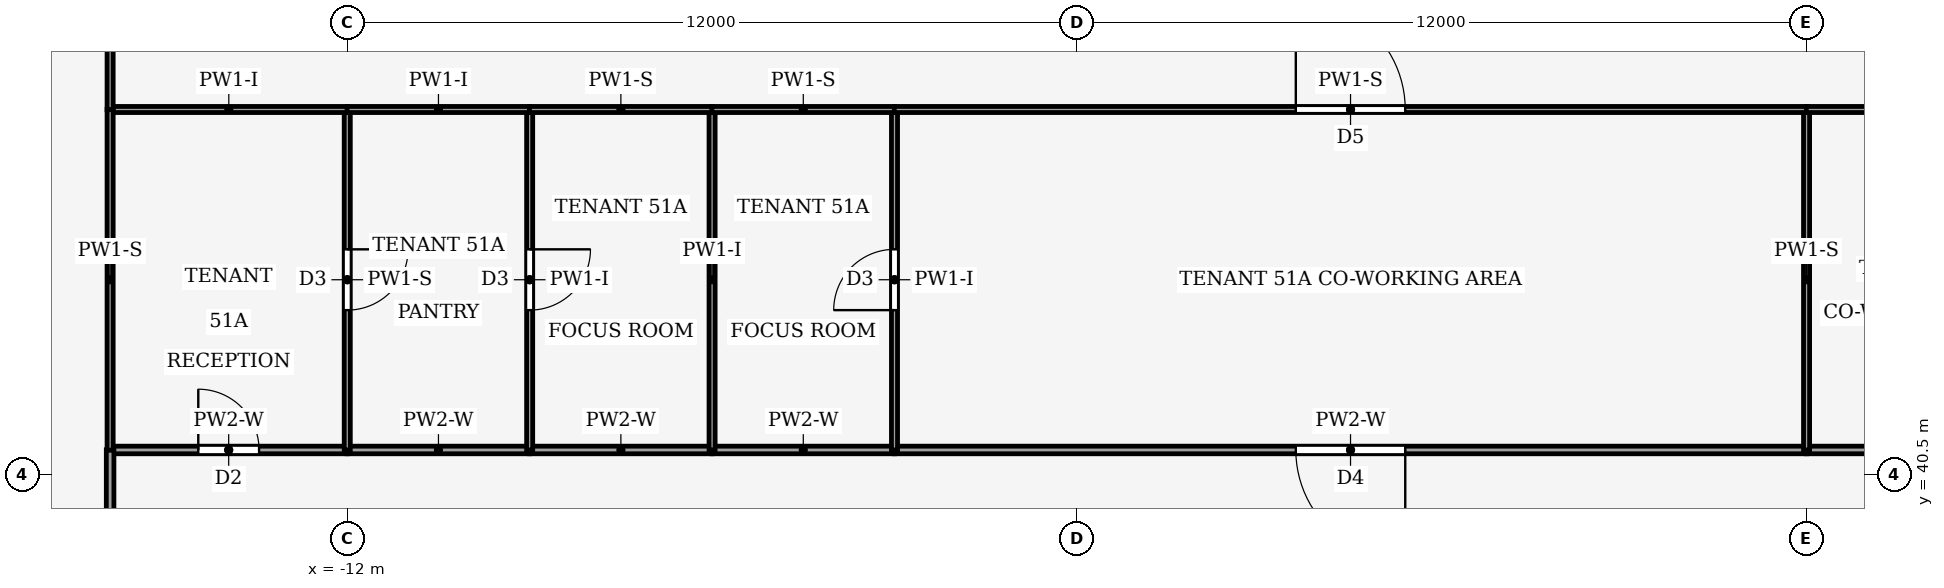
"""IFC4 building model, lengths in metres.
Left out: names, types, materials, properties, quantities, classifications, styles, units other than length and angle.
Written with IfcOpenShell. Run it as: python <this file> out.ifc"""

import sys

from ifc_helpers import new_model, si_unit, direction, frame, frame_2d, origin, place, context, subcontext, project, spatial, rectangle, extrude, element, fill, save


model = new_model("IFC4")
c1 = context("Model", 3, precision=1e-05, world=origin(), true_north=direction((0.0, 1.0)))
c2 = subcontext(c1, "Body", "Model", "MODEL_VIEW")
j1 = project(units=[si_unit("LENGTHUNIT", "METRE"), si_unit("PLANEANGLEUNIT", "RADIAN")], contexts=[c1])
p1 = place(None, origin())
s1 = spatial("IfcSite", under=j1, at=p1, CompositionType="ELEMENT")
p2 = place(p1, origin())
s2 = spatial("IfcBuilding", under=s1, at=p2, CompositionType="ELEMENT")
p3 = place(p2, frame((0.0, 0.0, 222.0)))
s3 = spatial("IfcBuildingStorey", under=s2, at=p3, CompositionType="ELEMENT", Elevation=222.0)
p4 = place(p3, frame((-15.9, 40.9, 0.0), z_axis=(0.0, 0.0, 1.0), x_axis=(1.0, 0.0, 0.0)))
e1 = element("IfcWall", 1, at=p4, inside=s3, PredefinedType="PARTITIONING", context=c2, shape_type="SweptSolid", body=[
    extrude(rectangle(XDim=3.9, YDim=0.125, at=frame_2d((1.95, 0.0))), origin(), (0.0, 0.0, 1.0), 3.32),
])
p5 = place(p4, frame((1.45, 0.0, 0.0)))
e2 = element("IfcOpeningElement", 2, at=p5, cuts=e1, PredefinedType="OPENING", context=c2, shape_type="SweptSolid", body=[
    extrude(rectangle(XDim=1.0, YDim=2.1, at=frame_2d((0.5, 1.05))), frame((0.0, 0.073, 0.0), z_axis=(0.0, -1.0, 0.0), x_axis=(1.0, 0.0, 0.0)), (0.0, 0.0, 1.0), 0.145),
])
for number, where, z_axis, x_axis in (
    (3, (-9.0, 40.9, 0.0), (0.0, 0.0, 1.0), (-1.0, 0.0, 0.0)),
    (4, (-6.0, 40.9, 0.0), (0.0, 0.0, 1.0), (-1.0, 0.0, 0.0)),
    (5, (-3.0, 40.9, 0.0), (0.0, 0.0, 1.0), (-1.0, 0.0, 0.0)),
):
    element("IfcWall", number, at=place(p3, frame(where, z_axis=z_axis, x_axis=x_axis)), inside=s3, PredefinedType="PARTITIONING", context=c2, shape_type="SweptSolid", body=[
        extrude(rectangle(XDim=3.0, YDim=0.125, at=frame_2d((1.5, 0.0))), origin(), (0.0, 0.0, 1.0), 3.32),
    ])
p6 = place(p3, frame((12.0, 40.9, 0.0), z_axis=(0.0, 0.0, 1.0), x_axis=(-1.0, 0.0, 0.0)))
e6 = element("IfcWall", 6, at=p6, inside=s3, PredefinedType="PARTITIONING", context=c2, shape_type="SweptSolid", body=[
    extrude(rectangle(XDim=15.0, YDim=0.125, at=frame_2d((7.5, 0.0))), origin(), (0.0, 0.0, 1.0), 3.32),
])
p7 = place(p6, frame((6.6, 0.0, 0.0)))
e7 = element("IfcOpeningElement", 7, at=p7, cuts=e6, PredefinedType="OPENING", context=c2, shape_type="SweptSolid", body=[
    extrude(rectangle(XDim=1.8, YDim=2.1, at=frame_2d((0.9, 1.05))), frame((0.0, 0.073, 0.0), z_axis=(0.0, -1.0, 0.0), x_axis=(1.0, 0.0, 0.0)), (0.0, 0.0, 1.0), 0.145),
])
p8 = place(p3, frame((12.0, 40.9, 0.0), z_axis=(0.0, 0.0, 1.0), x_axis=(1.0, 0.0, 0.0)))
e8 = element("IfcWall", 8, at=p8, inside=s3, PredefinedType="PARTITIONING", context=c2, shape_type="SweptSolid", body=[
    extrude(rectangle(XDim=3.9, YDim=0.125, at=frame_2d((1.95, 0.0))), origin(), (0.0, 0.0, 1.0), 3.32),
])
p9 = place(p8, frame((1.45, 0.0, 0.0)))
e9 = element("IfcOpeningElement", 9, at=p9, cuts=e8, PredefinedType="OPENING", context=c2, shape_type="SweptSolid", body=[
    extrude(rectangle(XDim=1.0, YDim=2.1, at=frame_2d((0.5, 1.05))), frame((0.0, 0.073, 0.0), z_axis=(0.0, -1.0, 0.0), x_axis=(1.0, 0.0, 0.0)), (0.0, 0.0, 1.0), 0.145),
])
p10 = place(p3, frame((-15.9, 34.5, 0.0), z_axis=(0.0, 0.0, 1.0), x_axis=(0.0, 1.0, 0.0)))
e10 = element("IfcWall", 10, at=p10, inside=s3, PredefinedType="PARTITIONING", context=c2, shape_type="SweptSolid", body=[
    extrude(rectangle(XDim=6.404, YDim=0.125, at=frame_2d((3.202, 0.0))), origin(), (0.0, 0.0, 1.0), 3.02),
])
p11 = place(p10, frame((2.702, 0.0, 0.0)))
e11 = element("IfcOpeningElement", 11, at=p11, cuts=e10, PredefinedType="OPENING", context=c2, shape_type="SweptSolid", body=[
    extrude(rectangle(XDim=1.0, YDim=2.1, at=frame_2d((0.5, 1.05))), frame((0.0, 0.073, 0.0), z_axis=(0.0, -1.0, 0.0), x_axis=(1.0, 0.0, 0.0)), (0.0, 0.0, 1.0), 0.145),
])
p12 = place(p3, frame((-12.0, 46.5, 0.0), z_axis=(0.0, 0.0, 1.0), x_axis=(0.0, -1.0, 0.0)))
e12 = element("IfcWall", 12, at=p12, inside=s3, PredefinedType="PARTITIONING", context=c2, shape_type="SweptSolid", body=[
    extrude(rectangle(XDim=5.6, YDim=0.1, at=frame_2d((2.8, 0.0))), origin(), (0.0, 0.0, 1.0), 3.32),
])
p13 = place(p12, frame((2.3, 0.0, 0.0)))
e13 = element("IfcOpeningElement", 13, at=p13, cuts=e12, PredefinedType="OPENING", context=c2, shape_type="SweptSolid", body=[
    extrude(rectangle(XDim=1.0, YDim=2.1, at=frame_2d((0.5, 1.05))), frame((0.0, 0.06, 0.0), z_axis=(0.0, -1.0, 0.0), x_axis=(1.0, 0.0, 0.0)), (0.0, 0.0, 1.0), 0.12),
])
p14 = place(p3, frame((-11.996, 46.5, 0.0), z_axis=(0.0, 0.0, 1.0), x_axis=(-1.0, 0.0, 0.0)))
e14 = element("IfcWall", 14, at=p14, inside=s3, PredefinedType="PARTITIONING", context=c2, shape_type="SweptSolid", body=[
    extrude(rectangle(XDim=3.904, YDim=0.1, at=frame_2d((1.952, 0.0))), origin(), (0.0, 0.0, 1.0), 3.75),
])
p15 = place(p3, frame((-15.9, 46.504, 0.0), z_axis=(0.0, 0.0, 1.0), x_axis=(0.0, -1.0, 0.0)))
e15 = element("IfcWall", 15, at=p15, inside=s3, PredefinedType="PARTITIONING", context=c2, shape_type="SweptSolid", body=[
    extrude(rectangle(XDim=5.608, YDim=0.1, at=frame_2d((2.804, 0.0))), origin(), (0.0, 0.0, 1.0), 3.32),
])
p16 = place(p3, frame((-9.0, 46.5, 0.0), z_axis=(0.0, 0.0, 1.0), x_axis=(0.0, -1.0, 0.0)))
e16 = element("IfcWall", 16, at=p16, inside=s3, PredefinedType="PARTITIONING", context=c2, shape_type="SweptSolid", body=[
    extrude(rectangle(XDim=5.6, YDim=0.1, at=frame_2d((2.8, 0.0))), origin(), (0.0, 0.0, 1.0), 3.75),
])
p17 = place(p16, frame((2.3, 0.0, 0.0)))
e17 = element("IfcOpeningElement", 17, at=p17, cuts=e16, PredefinedType="OPENING", context=c2, shape_type="SweptSolid", body=[
    extrude(rectangle(XDim=1.0, YDim=2.1, at=frame_2d((0.5, 1.05))), frame((0.0, 0.06, 0.0), z_axis=(0.0, -1.0, 0.0), x_axis=(1.0, 0.0, 0.0)), (0.0, 0.0, 1.0), 0.12),
])
p18 = place(p3, frame((-8.996, 46.5, 0.0), z_axis=(0.0, 0.0, 1.0), x_axis=(-1.0, 0.0, 0.0)))
e18 = element("IfcWall", 18, at=p18, inside=s3, PredefinedType="PARTITIONING", context=c2, shape_type="SweptSolid", body=[
    extrude(rectangle(XDim=3.008, YDim=0.1, at=frame_2d((1.504, 0.0))), origin(), (0.0, 0.0, 1.0), 3.75),
])
p19 = place(p3, frame((-6.0, 40.9, 0.0), z_axis=(0.0, 0.0, 1.0), x_axis=(0.0, 1.0, 0.0)))
e19 = element("IfcWall", 19, at=p19, inside=s3, PredefinedType="PARTITIONING", context=c2, shape_type="SweptSolid", body=[
    extrude(rectangle(XDim=5.6, YDim=0.1, at=frame_2d((2.8, 0.0))), origin(), (0.0, 0.0, 1.0), 3.75),
])
p20 = place(p3, frame((-5.996, 46.5, 0.0), z_axis=(0.0, 0.0, 1.0), x_axis=(-1.0, 0.0, 0.0)))
e20 = element("IfcWall", 20, at=p20, inside=s3, PredefinedType="PARTITIONING", context=c2, shape_type="SweptSolid", body=[
    extrude(rectangle(XDim=3.008, YDim=0.1, at=frame_2d((1.504, 0.0))), origin(), (0.0, 0.0, 1.0), 3.32),
])
p21 = place(p3, frame((-3.0, 40.9, 0.0), z_axis=(0.0, 0.0, 1.0), x_axis=(0.0, 1.0, 0.0)))
e21 = element("IfcWall", 21, at=p21, inside=s3, PredefinedType="PARTITIONING", context=c2, shape_type="SweptSolid", body=[
    extrude(rectangle(XDim=5.6, YDim=0.1, at=frame_2d((2.8, 0.0))), origin(), (0.0, 0.0, 1.0), 3.75),
])
p22 = place(p21, frame((2.3, 0.0, 0.0)))
e22 = element("IfcOpeningElement", 22, at=p22, cuts=e21, PredefinedType="OPENING", context=c2, shape_type="SweptSolid", body=[
    extrude(rectangle(XDim=1.0, YDim=2.1, at=frame_2d((0.5, 1.05))), frame((0.0, 0.06, 0.0), z_axis=(0.0, -1.0, 0.0), x_axis=(1.0, 0.0, 0.0)), (0.0, 0.0, 1.0), 0.12),
])
p23 = place(p3, frame((-2.996, 46.5, 0.0), z_axis=(0.0, 0.0, 1.0), x_axis=(-1.0, 0.0, 0.0)))
e23 = element("IfcWall", 23, at=p23, inside=s3, PredefinedType="PARTITIONING", context=c2, shape_type="SweptSolid", body=[
    extrude(rectangle(XDim=3.008, YDim=0.1, at=frame_2d((1.504, 0.0))), origin(), (0.0, 0.0, 1.0), 3.32),
])
p24 = place(p3, frame((12.0, 40.9, 0.0), z_axis=(0.0, 0.0, 1.0), x_axis=(0.0, 1.0, 0.0)))
e24 = element("IfcWall", 24, at=p24, inside=s3, PredefinedType="PARTITIONING", context=c2, shape_type="SweptSolid", body=[
    extrude(rectangle(XDim=5.6, YDim=0.1, at=frame_2d((2.8, 0.0))), origin(), (0.0, 0.0, 1.0), 3.32),
])
p25 = place(p3, frame((-3.004, 46.5, 0.0), z_axis=(0.0, 0.0, 1.0), x_axis=(1.0, 0.0, 0.0)))
e25 = element("IfcWall", 25, at=p25, inside=s3, PredefinedType="PARTITIONING", context=c2, shape_type="SweptSolid", body=[
    extrude(rectangle(XDim=15.008, YDim=0.1, at=frame_2d((7.504, 0.0))), origin(), (0.0, 0.0, 1.0), 3.32),
])
p26 = place(p25, frame((6.604, 0.0, 0.0)))
e26 = element("IfcOpeningElement", 26, at=p26, cuts=e25, PredefinedType="OPENING", context=c2, shape_type="SweptSolid", body=[
    extrude(rectangle(XDim=1.8, YDim=2.1, at=frame_2d((0.9, 1.05))), frame((0.0, 0.06, 0.0), z_axis=(0.0, -1.0, 0.0), x_axis=(1.0, 0.0, 0.0)), (0.0, 0.0, 1.0), 0.12),
])
p27 = place(p3, frame((15.9, 46.5, 0.0), z_axis=(0.0, 0.0, 1.0), x_axis=(-1.0, 0.0, 0.0)))
e27 = element("IfcWall", 27, at=p27, inside=s3, PredefinedType="PARTITIONING", context=c2, shape_type="SweptSolid", body=[
    extrude(rectangle(XDim=3.904, YDim=0.1, at=frame_2d((1.952, 0.0))), origin(), (0.0, 0.0, 1.0), 3.75),
])
p28 = place(p3, frame((-15.9, 61.504, 0.0), z_axis=(0.0, 0.0, 1.0), x_axis=(0.0, -1.0, 0.0)))
e28 = element("IfcWall", 28, at=p28, inside=s3, PredefinedType="PARTITIONING", context=c2, shape_type="SweptSolid", body=[
    extrude(rectangle(XDim=15.008, YDim=0.1, at=frame_2d((7.504, 0.0))), origin(), (0.0, 0.0, 1.0), 3.12),
])
p29 = place(p5, origin())
e29 = element("IfcDoor", 29, at=p29, inside=s3, OperationType="SINGLE_SWING_LEFT", PredefinedType="DOOR", context=c2, shape_type="SweptSolid", body=[
    extrude(rectangle(XDim=1.0, YDim=2.1, at=frame_2d((0.5, 1.05))), frame((0.0, 0.025, 0.0), z_axis=(0.0, -1.0, 0.0), x_axis=(1.0, 0.0, 0.0)), (0.0, 0.0, 1.0), 0.05),
])
fill(e2, e29)
p30 = place(p7, origin())
e30 = element("IfcDoor", 30, at=p30, inside=s3, OperationType="DOUBLE_DOOR_SINGLE_SWING", PredefinedType="DOOR", context=c2, shape_type="SweptSolid", body=[
    extrude(rectangle(XDim=1.8, YDim=2.1, at=frame_2d((0.9, 1.05))), frame((0.0, 0.025, 0.0), z_axis=(0.0, -1.0, 0.0), x_axis=(1.0, 0.0, 0.0)), (0.0, 0.0, 1.0), 0.05),
])
fill(e7, e30)
p31 = place(p13, origin())
e31 = element("IfcDoor", 31, at=p31, inside=s3, OperationType="SINGLE_SWING_LEFT", PredefinedType="DOOR", context=c2, shape_type="SweptSolid", body=[
    extrude(rectangle(XDim=1.0, YDim=2.1, at=frame_2d((0.5, 1.05))), frame((0.0, 0.025, 0.0), z_axis=(0.0, -1.0, 0.0), x_axis=(1.0, 0.0, 0.0)), (0.0, 0.0, 1.0), 0.05),
])
fill(e13, e31)
p32 = place(p17, origin())
e32 = element("IfcDoor", 32, at=p32, inside=s3, OperationType="SINGLE_SWING_RIGHT", PredefinedType="DOOR", context=c2, shape_type="SweptSolid", body=[
    extrude(rectangle(XDim=1.0, YDim=2.1, at=frame_2d((0.5, 1.05))), frame((0.0, 0.025, 0.0), z_axis=(0.0, -1.0, 0.0), x_axis=(1.0, 0.0, 0.0)), (0.0, 0.0, 1.0), 0.05),
])
fill(e17, e32)
p33 = place(p22, origin())
e33 = element("IfcDoor", 33, at=p33, inside=s3, OperationType="SINGLE_SWING_LEFT", PredefinedType="DOOR", context=c2, shape_type="SweptSolid", body=[
    extrude(rectangle(XDim=1.0, YDim=2.1, at=frame_2d((0.5, 1.05))), frame((0.0, 0.025, 0.0), z_axis=(0.0, -1.0, 0.0), x_axis=(1.0, 0.0, 0.0)), (0.0, 0.0, 1.0), 0.05),
])
fill(e22, e33)
p34 = place(p26, origin())
e34 = element("IfcDoor", 34, at=p34, inside=s3, OperationType="DOUBLE_DOOR_SINGLE_SWING", PredefinedType="DOOR", context=c2, shape_type="SweptSolid", body=[
    extrude(rectangle(XDim=1.8, YDim=2.1, at=frame_2d((0.9, 1.05))), frame((0.0, 0.025, 0.0), z_axis=(0.0, -1.0, 0.0), x_axis=(1.0, 0.0, 0.0)), (0.0, 0.0, 1.0), 0.05),
])
fill(e26, e34)
save(model, sys.argv[1])
